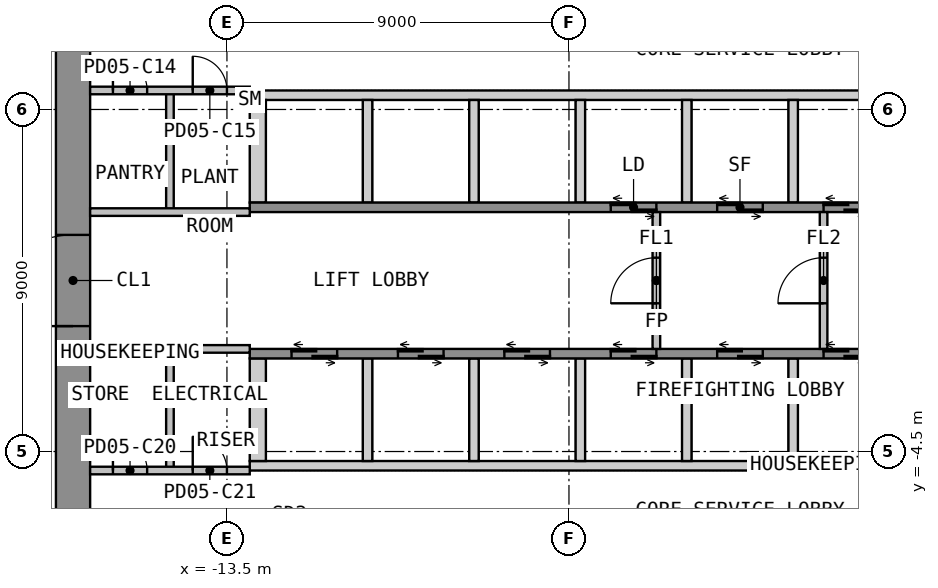
"""IFC4 building model, lengths in metres.
Left out: names, types, materials, properties, quantities, classifications, styles, units other than length and angle.
Written with IfcOpenShell. Run it as: python <this file> out.ifc"""

import sys

from ifc_helpers import new_model, si_unit, direction, frame, frame_2d, origin, place, context, subcontext, project, spatial, polyline, rectangle, outline, extrude, element, fill, save


model = new_model("IFC4")
c1 = context("Model", 3, precision=1e-05, world=origin(), true_north=direction((0.0, 1.0)))
c2 = subcontext(c1, "Body", "Model", "MODEL_VIEW")
j1 = project(units=[si_unit("LENGTHUNIT", "METRE"), si_unit("PLANEANGLEUNIT", "RADIAN")], contexts=[c1])
p1 = place(None, origin())
s1 = spatial("IfcSite", under=j1, at=p1, CompositionType="ELEMENT")
p2 = place(p1, origin())
s2 = spatial("IfcBuilding", under=s1, at=p2, CompositionType="ELEMENT")
p3 = place(p2, frame((0.0, 0.0, 25.2)))
s3 = spatial("IfcBuildingStorey", under=s2, at=p3, CompositionType="ELEMENT", Elevation=25.2)
p4 = place(p3, frame((-17.55, -12.6, 0.0), z_axis=(0.0, 0.0, 1.0), x_axis=(0.0, 1.0, 0.0)))
e1 = element("IfcWall", 1, at=p4, inside=s3, PredefinedType="SHEAR", context=c2, shape_type="SweptSolid", body=[
    extrude(rectangle(XDim=25.2, YDim=0.9, at=frame_2d((12.6, 0.0))), origin(), (0.0, 0.0, 1.0), 4.425),
])
p5 = place(p4, frame((11.4, 0.0, 0.0)))
e2 = element("IfcOpeningElement", 2, at=p5, cuts=e1, PredefinedType="OPENING", context=c2, shape_type="SweptSolid", body=[
    extrude(rectangle(XDim=2.4, YDim=2.1, at=frame_2d((1.2, 1.05))), frame((0.0, 0.46, 0.0), z_axis=(0.0, -1.0, 0.0), x_axis=(1.0, 0.0, 0.0)), (0.0, 0.0, 1.0), 0.92),
])
p6 = place(p3, origin())
e3 = element("IfcWall", 3, at=p6, inside=s3, PredefinedType="SHEAR", context=c2, shape_type="SweptSolid", body=[
    extrude(outline(polyline([(-12.9, 4.75), (12.9, 4.75), (12.9, 5.0), (-12.9, 5.0), (-12.9, 4.75)])), origin(), (0.0, 0.0, 1.0), 4.425),
])
p7 = place(p3, origin())
e4 = element("IfcWall", 4, at=p7, inside=s3, PredefinedType="SHEAR", context=c2, shape_type="SweptSolid", body=[
    extrude(outline(polyline([(-12.9, 2.05), (-12.475, 2.05), (-12.475, 4.75), (-12.9, 4.75), (-12.9, 2.05)])), origin(), (0.0, 0.0, 1.0), 4.425),
])
p8 = place(p3, origin())
e5 = element("IfcWall", 5, at=p8, inside=s3, PredefinedType="SHEAR", context=c2, shape_type="SweptSolid", body=[
    extrude(outline(polyline([(-9.925, 2.05), (-9.675, 2.05), (-9.675, 4.75), (-9.925, 4.75), (-9.925, 2.05)])), origin(), (0.0, 0.0, 1.0), 4.425),
])
p9 = place(p3, origin())
e6 = element("IfcWall", 6, at=p9, inside=s3, PredefinedType="SHEAR", context=c2, shape_type="SweptSolid", body=[
    extrude(outline(polyline([(-7.125, 2.05), (-6.875, 2.05), (-6.875, 4.75), (-7.125, 4.75), (-7.125, 2.05)])), origin(), (0.0, 0.0, 1.0), 4.425),
])
p10 = place(p3, origin())
e7 = element("IfcWall", 7, at=p10, inside=s3, PredefinedType="SHEAR", context=c2, shape_type="SweptSolid", body=[
    extrude(outline(polyline([(-4.325, 2.05), (-4.075, 2.05), (-4.075, 4.75), (-4.325, 4.75), (-4.325, 2.05)])), origin(), (0.0, 0.0, 1.0), 4.425),
])
p11 = place(p3, origin())
e8 = element("IfcWall", 8, at=p11, inside=s3, PredefinedType="SHEAR", context=c2, shape_type="SweptSolid", body=[
    extrude(outline(polyline([(-1.525, 2.05), (-1.275, 2.05), (-1.275, 4.75), (-1.525, 4.75), (-1.525, 2.05)])), origin(), (0.0, 0.0, 1.0), 4.425),
])
p12 = place(p3, origin())
e9 = element("IfcWall", 9, at=p12, inside=s3, PredefinedType="SHEAR", context=c2, shape_type="SweptSolid", body=[
    extrude(outline(polyline([(1.275, 2.05), (1.525, 2.05), (1.525, 4.75), (1.275, 4.75), (1.275, 2.05)])), origin(), (0.0, 0.0, 1.0), 4.425),
])
p13 = place(p3, frame((-12.9, 1.925, 0.0), z_axis=(0.0, 0.0, 1.0), x_axis=(1.0, 0.0, 0.0)))
e10 = element("IfcWall", 10, at=p13, inside=s3, PredefinedType="SHEAR", context=c2, shape_type="SweptSolid", body=[
    extrude(rectangle(XDim=25.8, YDim=0.25, at=frame_2d((12.9, 0.0))), origin(), (0.0, 0.0, 1.0), 4.425),
])
p14 = place(p13, frame((9.5, 0.0, 0.0)))
e11 = element("IfcOpeningElement", 11, at=p14, cuts=e10, PredefinedType="OPENING", context=c2, shape_type="SweptSolid", body=[
    extrude(rectangle(XDim=1.2, YDim=2.1, at=frame_2d((0.6, 1.05))), frame((0.0, 0.135, 0.0), z_axis=(0.0, -1.0, 0.0), x_axis=(1.0, 0.0, 0.0)), (0.0, 0.0, 1.0), 0.27),
])
p15 = place(p13, frame((12.3, 0.0, 0.0)))
e12 = element("IfcOpeningElement", 12, at=p15, cuts=e10, PredefinedType="OPENING", context=c2, shape_type="SweptSolid", body=[
    extrude(rectangle(XDim=1.2, YDim=2.1, at=frame_2d((0.6, 1.05))), frame((0.0, 0.135, 0.0), z_axis=(0.0, -1.0, 0.0), x_axis=(1.0, 0.0, 0.0)), (0.0, 0.0, 1.0), 0.27),
])
p16 = place(p13, frame((15.1, 0.0, 0.0)))
e13 = element("IfcOpeningElement", 13, at=p16, cuts=e10, PredefinedType="OPENING", context=c2, shape_type="SweptSolid", body=[
    extrude(rectangle(XDim=1.2, YDim=2.1, at=frame_2d((0.6, 1.05))), frame((0.0, 0.135, 0.0), z_axis=(0.0, -1.0, 0.0), x_axis=(1.0, 0.0, 0.0)), (0.0, 0.0, 1.0), 0.27),
])
p17 = place(p13, frame((17.9, 0.0, 0.0)))
e14 = element("IfcOpeningElement", 14, at=p17, cuts=e10, PredefinedType="OPENING", context=c2, shape_type="SweptSolid", body=[
    extrude(rectangle(XDim=1.2, YDim=2.1, at=frame_2d((0.6, 1.05))), frame((0.0, 0.135, 0.0), z_axis=(0.0, -1.0, 0.0), x_axis=(1.0, 0.0, 0.0)), (0.0, 0.0, 1.0), 0.27),
])
p18 = place(p13, frame((20.7, 0.0, 0.0)))
e15 = element("IfcOpeningElement", 15, at=p18, cuts=e10, PredefinedType="OPENING", context=c2, shape_type="SweptSolid", body=[
    extrude(rectangle(XDim=1.2, YDim=2.1, at=frame_2d((0.6, 1.05))), frame((0.0, 0.135, 0.0), z_axis=(0.0, -1.0, 0.0), x_axis=(1.0, 0.0, 0.0)), (0.0, 0.0, 1.0), 0.27),
])
p19 = place(p13, frame((23.5, 0.0, 0.0)))
e16 = element("IfcOpeningElement", 16, at=p19, cuts=e10, PredefinedType="OPENING", context=c2, shape_type="SweptSolid", body=[
    extrude(rectangle(XDim=1.2, YDim=2.1, at=frame_2d((0.6, 1.05))), frame((0.0, 0.135, 0.0), z_axis=(0.0, -1.0, 0.0), x_axis=(1.0, 0.0, 0.0)), (0.0, 0.0, 1.0), 0.27),
])
p20 = place(p3, origin())
e17 = element("IfcWall", 17, at=p20, inside=s3, PredefinedType="SHEAR", context=c2, shape_type="SweptSolid", body=[
    extrude(outline(polyline([(-12.9, -5.0), (12.9, -5.0), (12.9, -4.75), (-12.9, -4.75), (-12.9, -5.0)])), origin(), (0.0, 0.0, 1.0), 4.425),
])
p21 = place(p3, origin())
e18 = element("IfcWall", 18, at=p21, inside=s3, PredefinedType="SHEAR", context=c2, shape_type="SweptSolid", body=[
    extrude(outline(polyline([(-12.9, -4.75), (-12.475, -4.75), (-12.475, -2.05), (-12.9, -2.05), (-12.9, -4.75)])), origin(), (0.0, 0.0, 1.0), 4.425),
])
p22 = place(p3, origin())
e19 = element("IfcWall", 19, at=p22, inside=s3, PredefinedType="SHEAR", context=c2, shape_type="SweptSolid", body=[
    extrude(outline(polyline([(-9.925, -4.75), (-9.675, -4.75), (-9.675, -2.05), (-9.925, -2.05), (-9.925, -4.75)])), origin(), (0.0, 0.0, 1.0), 4.425),
])
p23 = place(p3, origin())
e20 = element("IfcWall", 20, at=p23, inside=s3, PredefinedType="SHEAR", context=c2, shape_type="SweptSolid", body=[
    extrude(outline(polyline([(-7.125, -4.75), (-6.875, -4.75), (-6.875, -2.05), (-7.125, -2.05), (-7.125, -4.75)])), origin(), (0.0, 0.0, 1.0), 4.425),
])
p24 = place(p3, origin())
e21 = element("IfcWall", 21, at=p24, inside=s3, PredefinedType="SHEAR", context=c2, shape_type="SweptSolid", body=[
    extrude(outline(polyline([(-4.325, -4.75), (-4.075, -4.75), (-4.075, -2.05), (-4.325, -2.05), (-4.325, -4.75)])), origin(), (0.0, 0.0, 1.0), 4.425),
])
p25 = place(p3, origin())
e22 = element("IfcWall", 22, at=p25, inside=s3, PredefinedType="SHEAR", context=c2, shape_type="SweptSolid", body=[
    extrude(outline(polyline([(-1.525, -4.75), (-1.275, -4.75), (-1.275, -2.05), (-1.525, -2.05), (-1.525, -4.75)])), origin(), (0.0, 0.0, 1.0), 4.425),
])
p26 = place(p3, origin())
e23 = element("IfcWall", 23, at=p26, inside=s3, PredefinedType="SHEAR", context=c2, shape_type="SweptSolid", body=[
    extrude(outline(polyline([(1.275, -4.75), (1.525, -4.75), (1.525, -2.05), (1.275, -2.05), (1.275, -4.75)])), origin(), (0.0, 0.0, 1.0), 4.425),
])
p27 = place(p3, frame((-12.9, -1.925, 0.0), z_axis=(0.0, 0.0, 1.0), x_axis=(1.0, 0.0, 0.0)))
e24 = element("IfcWall", 24, at=p27, inside=s3, PredefinedType="SHEAR", context=c2, shape_type="SweptSolid", body=[
    extrude(rectangle(XDim=25.8, YDim=0.25, at=frame_2d((12.9, 0.0))), origin(), (0.0, 0.0, 1.0), 4.425),
])
p28 = place(p27, frame((1.1, 0.0, 0.0)))
e25 = element("IfcOpeningElement", 25, at=p28, cuts=e24, PredefinedType="OPENING", context=c2, shape_type="SweptSolid", body=[
    extrude(rectangle(XDim=1.2, YDim=2.1, at=frame_2d((0.6, 1.05))), frame((0.0, 0.135, 0.0), z_axis=(0.0, -1.0, 0.0), x_axis=(1.0, 0.0, 0.0)), (0.0, 0.0, 1.0), 0.27),
])
p29 = place(p27, frame((3.9, 0.0, 0.0)))
e26 = element("IfcOpeningElement", 26, at=p29, cuts=e24, PredefinedType="OPENING", context=c2, shape_type="SweptSolid", body=[
    extrude(rectangle(XDim=1.2, YDim=2.1, at=frame_2d((0.6, 1.05))), frame((0.0, 0.135, 0.0), z_axis=(0.0, -1.0, 0.0), x_axis=(1.0, 0.0, 0.0)), (0.0, 0.0, 1.0), 0.27),
])
p30 = place(p27, frame((6.7, 0.0, 0.0)))
e27 = element("IfcOpeningElement", 27, at=p30, cuts=e24, PredefinedType="OPENING", context=c2, shape_type="SweptSolid", body=[
    extrude(rectangle(XDim=1.2, YDim=2.1, at=frame_2d((0.6, 1.05))), frame((0.0, 0.135, 0.0), z_axis=(0.0, -1.0, 0.0), x_axis=(1.0, 0.0, 0.0)), (0.0, 0.0, 1.0), 0.27),
])
p31 = place(p27, frame((9.5, 0.0, 0.0)))
e28 = element("IfcOpeningElement", 28, at=p31, cuts=e24, PredefinedType="OPENING", context=c2, shape_type="SweptSolid", body=[
    extrude(rectangle(XDim=1.2, YDim=2.1, at=frame_2d((0.6, 1.05))), frame((0.0, 0.135, 0.0), z_axis=(0.0, -1.0, 0.0), x_axis=(1.0, 0.0, 0.0)), (0.0, 0.0, 1.0), 0.27),
])
p32 = place(p27, frame((12.3, 0.0, 0.0)))
e29 = element("IfcOpeningElement", 29, at=p32, cuts=e24, PredefinedType="OPENING", context=c2, shape_type="SweptSolid", body=[
    extrude(rectangle(XDim=1.2, YDim=2.1, at=frame_2d((0.6, 1.05))), frame((0.0, 0.135, 0.0), z_axis=(0.0, -1.0, 0.0), x_axis=(1.0, 0.0, 0.0)), (0.0, 0.0, 1.0), 0.27),
])
p33 = place(p27, frame((15.1, 0.0, 0.0)))
e30 = element("IfcOpeningElement", 30, at=p33, cuts=e24, PredefinedType="OPENING", context=c2, shape_type="SweptSolid", body=[
    extrude(rectangle(XDim=1.2, YDim=2.1, at=frame_2d((0.6, 1.05))), frame((0.0, 0.135, 0.0), z_axis=(0.0, -1.0, 0.0), x_axis=(1.0, 0.0, 0.0)), (0.0, 0.0, 1.0), 0.27),
])
p34 = place(p3, frame((-2.2, -1.8, 0.0), z_axis=(0.0, 0.0, 1.0), x_axis=(0.0, 1.0, 0.0)))
e31 = element("IfcWall", 31, at=p34, inside=s3, PredefinedType="PARTITIONING", context=c2, shape_type="SweptSolid", body=[
    extrude(rectangle(XDim=3.6, YDim=0.2, at=frame_2d((1.8, 0.0))), origin(), (0.0, 0.0, 1.0), 4.425),
])
p35 = place(p34, frame((1.2, 0.0, 0.0)))
e32 = element("IfcOpeningElement", 32, at=p35, cuts=e31, PredefinedType="OPENING", context=c2, shape_type="SweptSolid", body=[
    extrude(rectangle(XDim=1.2, YDim=2.1, at=frame_2d((0.6, 1.05))), frame((0.0, 0.11, 0.0), z_axis=(0.0, -1.0, 0.0), x_axis=(1.0, 0.0, 0.0)), (0.0, 0.0, 1.0), 0.22),
])
p36 = place(p3, frame((2.2, -1.8, 0.0), z_axis=(0.0, 0.0, 1.0), x_axis=(0.0, 1.0, 0.0)))
e33 = element("IfcWall", 33, at=p36, inside=s3, PredefinedType="PARTITIONING", context=c2, shape_type="SweptSolid", body=[
    extrude(rectangle(XDim=3.6, YDim=0.2, at=frame_2d((1.8, 0.0))), origin(), (0.0, 0.0, 1.0), 4.425),
])
p37 = place(p36, frame((1.2, 0.0, 0.0)))
e34 = element("IfcOpeningElement", 34, at=p37, cuts=e33, PredefinedType="OPENING", context=c2, shape_type="SweptSolid", body=[
    extrude(rectangle(XDim=1.2, YDim=2.1, at=frame_2d((0.6, 1.05))), frame((0.0, 0.11, 0.0), z_axis=(0.0, -1.0, 0.0), x_axis=(1.0, 0.0, 0.0)), (0.0, 0.0, 1.0), 0.22),
])
p38 = place(p3, frame((-15.0, 1.8, 0.0), z_axis=(0.0, 0.0, 1.0), x_axis=(0.0, 1.0, 0.0)))
e35 = element("IfcWall", 35, at=p38, inside=s3, PredefinedType="PARTITIONING", context=c2, shape_type="SweptSolid", body=[
    extrude(rectangle(XDim=3.2, YDim=0.2, at=frame_2d((1.6, 0.0))), origin(), (0.0, 0.0, 1.0), 4.425),
])
p39 = place(p3, frame((-17.1, 5.0, 0.0), z_axis=(0.0, 0.0, 1.0), x_axis=(1.0, 0.0, 0.0)))
e36 = element("IfcWall", 36, at=p39, inside=s3, PredefinedType="PARTITIONING", context=c2, shape_type="SweptSolid", body=[
    extrude(rectangle(XDim=4.2, YDim=0.2, at=frame_2d((2.1, 0.0))), origin(), (0.0, 0.0, 1.0), 4.425),
])
p40 = place(p39, frame((0.6, 0.0, 0.0)))
e37 = element("IfcOpeningElement", 37, at=p40, cuts=e36, PredefinedType="OPENING", context=c2, shape_type="SweptSolid", body=[
    extrude(rectangle(XDim=0.9, YDim=2.1, at=frame_2d((0.45, 1.05))), frame((0.0, 0.11, 0.0), z_axis=(0.0, -1.0, 0.0), x_axis=(1.0, 0.0, 0.0)), (0.0, 0.0, 1.0), 0.22),
])
p41 = place(p39, frame((2.7, 0.0, 0.0)))
e38 = element("IfcOpeningElement", 38, at=p41, cuts=e36, PredefinedType="OPENING", context=c2, shape_type="SweptSolid", body=[
    extrude(rectangle(XDim=0.9, YDim=2.1, at=frame_2d((0.45, 1.05))), frame((0.0, 0.11, 0.0), z_axis=(0.0, -1.0, 0.0), x_axis=(1.0, 0.0, 0.0)), (0.0, 0.0, 1.0), 0.22),
])
p42 = place(p3, frame((-17.1, 1.8, 0.0), z_axis=(0.0, 0.0, 1.0), x_axis=(1.0, 0.0, 0.0)))
e39 = element("IfcWall", 39, at=p42, inside=s3, PredefinedType="PARTITIONING", context=c2, shape_type="SweptSolid", body=[
    extrude(rectangle(XDim=4.2, YDim=0.2, at=frame_2d((2.1, 0.0))), origin(), (0.0, 0.0, 1.0), 4.425),
])
p43 = place(p3, frame((-15.0, -5.0, 0.0), z_axis=(0.0, 0.0, 1.0), x_axis=(0.0, 1.0, 0.0)))
e40 = element("IfcWall", 40, at=p43, inside=s3, PredefinedType="PARTITIONING", context=c2, shape_type="SweptSolid", body=[
    extrude(rectangle(XDim=3.2, YDim=0.2, at=frame_2d((1.6, 0.0))), origin(), (0.0, 0.0, 1.0), 4.425),
])
p44 = place(p3, frame((-17.1, -5.0, 0.0), z_axis=(0.0, 0.0, 1.0), x_axis=(1.0, 0.0, 0.0)))
e41 = element("IfcWall", 41, at=p44, inside=s3, PredefinedType="PARTITIONING", context=c2, shape_type="SweptSolid", body=[
    extrude(rectangle(XDim=4.2, YDim=0.2, at=frame_2d((2.1, 0.0))), origin(), (0.0, 0.0, 1.0), 4.425),
])
p45 = place(p44, frame((0.6, 0.0, 0.0)))
e42 = element("IfcOpeningElement", 42, at=p45, cuts=e41, PredefinedType="OPENING", context=c2, shape_type="SweptSolid", body=[
    extrude(rectangle(XDim=0.9, YDim=2.1, at=frame_2d((0.45, 1.05))), frame((0.0, 0.11, 0.0), z_axis=(0.0, -1.0, 0.0), x_axis=(1.0, 0.0, 0.0)), (0.0, 0.0, 1.0), 0.22),
])
p46 = place(p44, frame((2.7, 0.0, 0.0)))
e43 = element("IfcOpeningElement", 43, at=p46, cuts=e41, PredefinedType="OPENING", context=c2, shape_type="SweptSolid", body=[
    extrude(rectangle(XDim=0.9, YDim=2.1, at=frame_2d((0.45, 1.05))), frame((0.0, 0.11, 0.0), z_axis=(0.0, -1.0, 0.0), x_axis=(1.0, 0.0, 0.0)), (0.0, 0.0, 1.0), 0.22),
])
p47 = place(p3, frame((-17.1, -1.8, 0.0), z_axis=(0.0, 0.0, 1.0), x_axis=(1.0, 0.0, 0.0)))
e44 = element("IfcWall", 44, at=p47, inside=s3, PredefinedType="PARTITIONING", context=c2, shape_type="SweptSolid", body=[
    extrude(rectangle(XDim=4.2, YDim=0.2, at=frame_2d((2.1, 0.0))), origin(), (0.0, 0.0, 1.0), 4.425),
])
p48 = place(p5, origin())
e45 = element("IfcDoor", 45, at=p48, inside=s3, OperationType="DOUBLE_DOOR_DOUBLE_SWING", PredefinedType="DOOR", context=c2, shape_type="SweptSolid", body=[
    extrude(rectangle(XDim=2.4, YDim=2.1, at=frame_2d((1.2, 1.05))), frame((0.0, 0.025, 0.0), z_axis=(0.0, -1.0, 0.0), x_axis=(1.0, 0.0, 0.0)), (0.0, 0.0, 1.0), 0.05),
])
fill(e2, e45)
p49 = place(p14, origin())
e46 = element("IfcDoor", 46, at=p49, inside=s3, OperationType="DOUBLE_DOOR_SLIDING", PredefinedType="DOOR", context=c2, shape_type="SweptSolid", body=[
    extrude(rectangle(XDim=1.2, YDim=2.1, at=frame_2d((0.6, 1.05))), frame((0.0, 0.025, 0.0), z_axis=(0.0, -1.0, 0.0), x_axis=(1.0, 0.0, 0.0)), (0.0, 0.0, 1.0), 0.05),
])
fill(e11, e46)
p50 = place(p15, origin())
e47 = element("IfcDoor", 47, at=p50, inside=s3, OperationType="DOUBLE_DOOR_SLIDING", PredefinedType="DOOR", context=c2, shape_type="SweptSolid", body=[
    extrude(rectangle(XDim=1.2, YDim=2.1, at=frame_2d((0.6, 1.05))), frame((0.0, 0.025, 0.0), z_axis=(0.0, -1.0, 0.0), x_axis=(1.0, 0.0, 0.0)), (0.0, 0.0, 1.0), 0.05),
])
fill(e12, e47)
p51 = place(p16, origin())
e48 = element("IfcDoor", 48, at=p51, inside=s3, OperationType="DOUBLE_DOOR_SLIDING", PredefinedType="DOOR", context=c2, shape_type="SweptSolid", body=[
    extrude(rectangle(XDim=1.2, YDim=2.1, at=frame_2d((0.6, 1.05))), frame((0.0, 0.025, 0.0), z_axis=(0.0, -1.0, 0.0), x_axis=(1.0, 0.0, 0.0)), (0.0, 0.0, 1.0), 0.05),
])
fill(e13, e48)
p52 = place(p28, origin())
e49 = element("IfcDoor", 49, at=p52, inside=s3, OperationType="DOUBLE_DOOR_SLIDING", PredefinedType="DOOR", context=c2, shape_type="SweptSolid", body=[
    extrude(rectangle(XDim=1.2, YDim=2.1, at=frame_2d((0.6, 1.05))), frame((0.0, 0.025, 0.0), z_axis=(0.0, -1.0, 0.0), x_axis=(1.0, 0.0, 0.0)), (0.0, 0.0, 1.0), 0.05),
])
fill(e25, e49)
p53 = place(p29, origin())
e50 = element("IfcDoor", 50, at=p53, inside=s3, OperationType="DOUBLE_DOOR_SLIDING", PredefinedType="DOOR", context=c2, shape_type="SweptSolid", body=[
    extrude(rectangle(XDim=1.2, YDim=2.1, at=frame_2d((0.6, 1.05))), frame((0.0, 0.025, 0.0), z_axis=(0.0, -1.0, 0.0), x_axis=(1.0, 0.0, 0.0)), (0.0, 0.0, 1.0), 0.05),
])
fill(e26, e50)
p54 = place(p30, origin())
e51 = element("IfcDoor", 51, at=p54, inside=s3, OperationType="DOUBLE_DOOR_SLIDING", PredefinedType="DOOR", context=c2, shape_type="SweptSolid", body=[
    extrude(rectangle(XDim=1.2, YDim=2.1, at=frame_2d((0.6, 1.05))), frame((0.0, 0.025, 0.0), z_axis=(0.0, -1.0, 0.0), x_axis=(1.0, 0.0, 0.0)), (0.0, 0.0, 1.0), 0.05),
])
fill(e27, e51)
p55 = place(p31, origin())
e52 = element("IfcDoor", 52, at=p55, inside=s3, OperationType="DOUBLE_DOOR_SLIDING", PredefinedType="DOOR", context=c2, shape_type="SweptSolid", body=[
    extrude(rectangle(XDim=1.2, YDim=2.1, at=frame_2d((0.6, 1.05))), frame((0.0, 0.025, 0.0), z_axis=(0.0, -1.0, 0.0), x_axis=(1.0, 0.0, 0.0)), (0.0, 0.0, 1.0), 0.05),
])
fill(e28, e52)
p56 = place(p32, origin())
e53 = element("IfcDoor", 53, at=p56, inside=s3, OperationType="DOUBLE_DOOR_SLIDING", PredefinedType="DOOR", context=c2, shape_type="SweptSolid", body=[
    extrude(rectangle(XDim=1.2, YDim=2.1, at=frame_2d((0.6, 1.05))), frame((0.0, 0.025, 0.0), z_axis=(0.0, -1.0, 0.0), x_axis=(1.0, 0.0, 0.0)), (0.0, 0.0, 1.0), 0.05),
])
fill(e29, e53)
p57 = place(p33, origin())
e54 = element("IfcDoor", 54, at=p57, inside=s3, OperationType="DOUBLE_DOOR_SLIDING", PredefinedType="DOOR", context=c2, shape_type="SweptSolid", body=[
    extrude(rectangle(XDim=1.2, YDim=2.1, at=frame_2d((0.6, 1.05))), frame((0.0, 0.025, 0.0), z_axis=(0.0, -1.0, 0.0), x_axis=(1.0, 0.0, 0.0)), (0.0, 0.0, 1.0), 0.05),
])
fill(e30, e54)
p58 = place(p35, origin())
e55 = element("IfcDoor", 55, at=p58, inside=s3, OperationType="SINGLE_SWING_LEFT", PredefinedType="DOOR", context=c2, shape_type="SweptSolid", body=[
    extrude(rectangle(XDim=1.2, YDim=2.1, at=frame_2d((0.6, 1.05))), frame((0.0, 0.025, 0.0), z_axis=(0.0, -1.0, 0.0), x_axis=(1.0, 0.0, 0.0)), (0.0, 0.0, 1.0), 0.05),
])
fill(e32, e55)
p59 = place(p37, origin())
e56 = element("IfcDoor", 56, at=p59, inside=s3, OperationType="SINGLE_SWING_LEFT", PredefinedType="DOOR", context=c2, shape_type="SweptSolid", body=[
    extrude(rectangle(XDim=1.2, YDim=2.1, at=frame_2d((0.6, 1.05))), frame((0.0, 0.025, 0.0), z_axis=(0.0, -1.0, 0.0), x_axis=(1.0, 0.0, 0.0)), (0.0, 0.0, 1.0), 0.05),
])
fill(e34, e56)
p60 = place(p40, origin())
e57 = element("IfcDoor", 57, at=p60, inside=s3, OperationType="SINGLE_SWING_LEFT", PredefinedType="DOOR", context=c2, shape_type="SweptSolid", body=[
    extrude(rectangle(XDim=0.9, YDim=2.1, at=frame_2d((0.45, 1.05))), frame((0.0, 0.025, 0.0), z_axis=(0.0, -1.0, 0.0), x_axis=(1.0, 0.0, 0.0)), (0.0, 0.0, 1.0), 0.05),
])
fill(e37, e57)
p61 = place(p41, origin())
e58 = element("IfcDoor", 58, at=p61, inside=s3, OperationType="SINGLE_SWING_LEFT", PredefinedType="DOOR", context=c2, shape_type="SweptSolid", body=[
    extrude(rectangle(XDim=0.9, YDim=2.1, at=frame_2d((0.45, 1.05))), frame((0.0, 0.025, 0.0), z_axis=(0.0, -1.0, 0.0), x_axis=(1.0, 0.0, 0.0)), (0.0, 0.0, 1.0), 0.05),
])
fill(e38, e58)
p62 = place(p45, origin())
e59 = element("IfcDoor", 59, at=p62, inside=s3, OperationType="SINGLE_SWING_LEFT", PredefinedType="DOOR", context=c2, shape_type="SweptSolid", body=[
    extrude(rectangle(XDim=0.9, YDim=2.1, at=frame_2d((0.45, 1.05))), frame((0.0, 0.025, 0.0), z_axis=(0.0, -1.0, 0.0), x_axis=(1.0, 0.0, 0.0)), (0.0, 0.0, 1.0), 0.05),
])
fill(e42, e59)
p63 = place(p46, origin())
e60 = element("IfcDoor", 60, at=p63, inside=s3, OperationType="SINGLE_SWING_LEFT", PredefinedType="DOOR", context=c2, shape_type="SweptSolid", body=[
    extrude(rectangle(XDim=0.9, YDim=2.1, at=frame_2d((0.45, 1.05))), frame((0.0, 0.025, 0.0), z_axis=(0.0, -1.0, 0.0), x_axis=(1.0, 0.0, 0.0)), (0.0, 0.0, 1.0), 0.05),
])
fill(e43, e60)
save(model, sys.argv[1])
